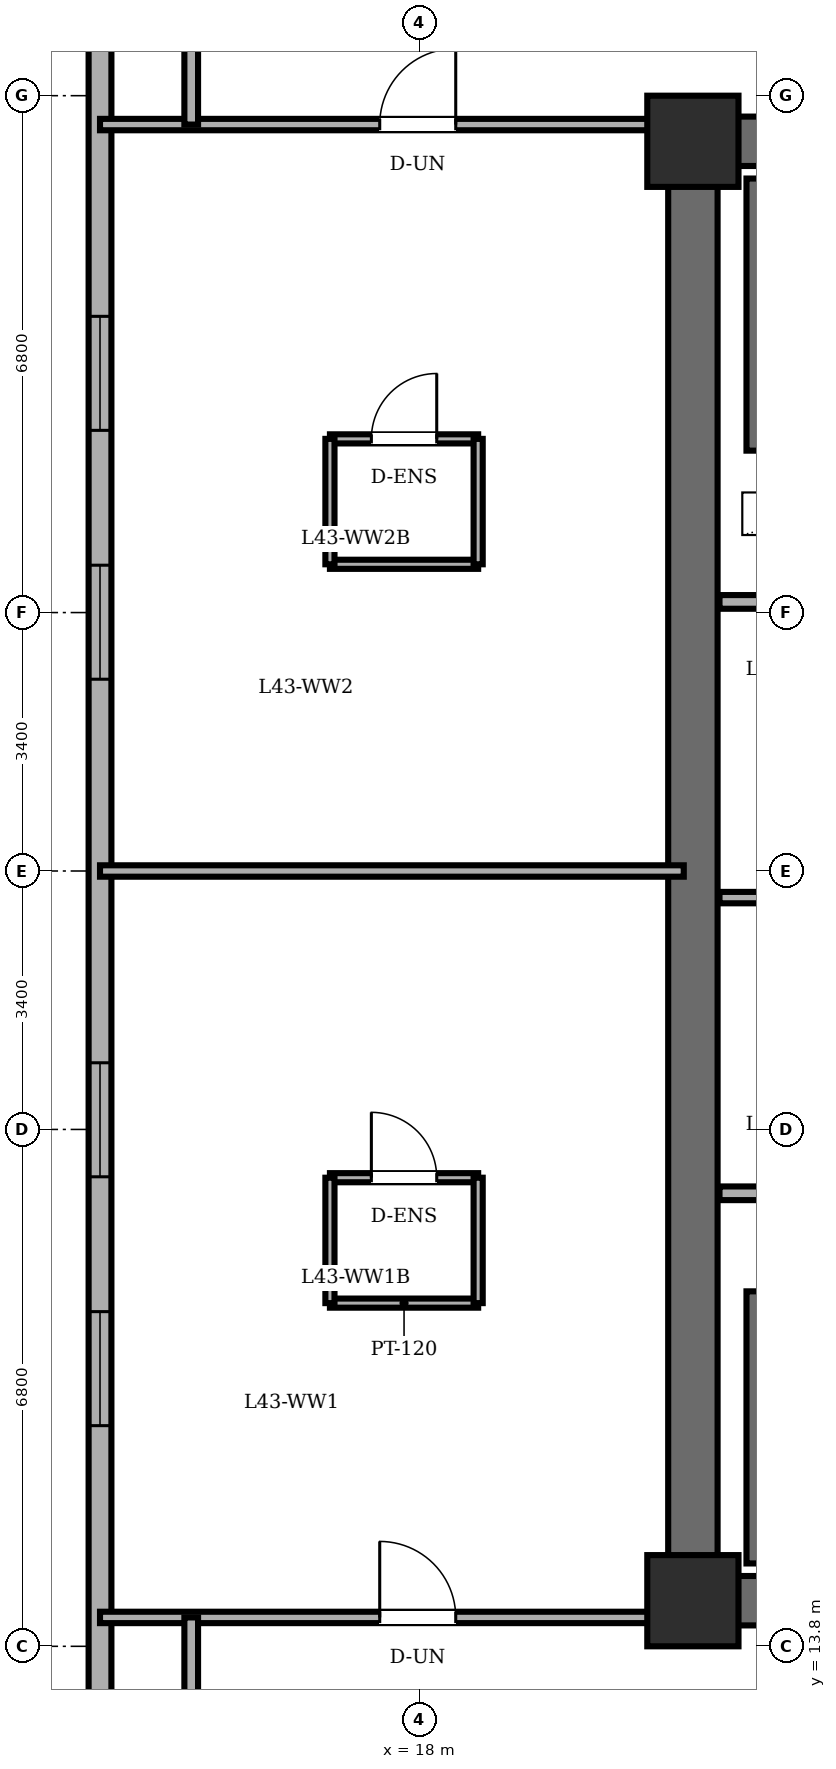
"""IFC4 building model, lengths in metres.
Left out: names, types, materials, properties, quantities, classifications, styles, units other than length and angle.
Written with IfcOpenShell. Run it as: python <this file> out.ifc"""

import sys

from ifc_helpers import new_model, si_unit, direction, frame, frame_2d, origin, origin_2d, place, context, subcontext, project, spatial, rectangle, extrude, element, fill, save


model = new_model("IFC4")
c1 = context("Model", 3, precision=1e-05, world=origin(), true_north=direction((0.0, 1.0)))
c2 = subcontext(c1, "Body", "Model", "MODEL_VIEW")
j1 = project(units=[si_unit("LENGTHUNIT", "METRE"), si_unit("PLANEANGLEUNIT", "RADIAN")], contexts=[c1])
p1 = place(None, origin())
s1 = spatial("IfcSite", under=j1, at=p1, CompositionType="ELEMENT")
p2 = place(p1, origin())
s2 = spatial("IfcBuilding", under=s1, at=p2, CompositionType="ELEMENT")
p3 = place(p2, frame((0.0, 0.0, 165.4)))
s3 = spatial("IfcBuildingStorey", under=s2, at=p3, CompositionType="ELEMENT", Elevation=165.4)
for number, where, z_axis, x_axis in (
    (1, (21.6, 14.4, 0.0), (0.0, 0.0, 1.0), (1.0, 0.0, 0.0)),
    (2, (21.6, 33.6, 0.0), (0.0, 0.0, 1.0), (1.0, 0.0, 0.0)),
):
    element("IfcColumn", number, at=place(p3, frame(where, z_axis=z_axis, x_axis=x_axis)), inside=s3, PredefinedType="COLUMN", context=c2, shape_type="SweptSolid", body=[
        extrude(rectangle(XDim=1.2, YDim=1.2, at=origin_2d()), origin(), (0.0, 0.0, 1.0), 3.6),
    ])
p4 = place(p3, frame((13.8, 36.3, 0.0), z_axis=(0.0, 0.0, 1.0), x_axis=(0.0, -1.0, 0.0)))
e3 = element("IfcWall", 3, at=p4, inside=s3, PredefinedType="SOLIDWALL", context=c2, shape_type="SweptSolid", body=[
    extrude(rectangle(XDim=24.6, YDim=0.3, at=frame_2d((12.3, 0.0))), origin(), (0.0, 0.0, 1.0), 3.4),
])
p5 = place(p4, frame((5.003, 0.0, 0.85)))
e4 = element("IfcOpeningElement", 4, at=p5, cuts=e3, PredefinedType="OPENING", context=c2, shape_type="SweptSolid", body=[
    extrude(rectangle(XDim=1.5, YDim=1.55, at=frame_2d((0.75, 0.775))), frame((0.0, 0.16, 0.0), z_axis=(0.0, -1.0, 0.0), x_axis=(1.0, 0.0, 0.0)), (0.0, 0.0, 1.0), 0.32),
])
p6 = place(p4, frame((8.277, 0.0, 0.85)))
e5 = element("IfcOpeningElement", 5, at=p6, cuts=e3, PredefinedType="OPENING", context=c2, shape_type="SweptSolid", body=[
    extrude(rectangle(XDim=1.5, YDim=1.55, at=frame_2d((0.75, 0.775))), frame((0.0, 0.16, 0.0), z_axis=(0.0, -1.0, 0.0), x_axis=(1.0, 0.0, 0.0)), (0.0, 0.0, 1.0), 0.32),
])
p7 = place(p4, frame((14.823, 0.0, 0.85)))
e6 = element("IfcOpeningElement", 6, at=p7, cuts=e3, PredefinedType="OPENING", context=c2, shape_type="SweptSolid", body=[
    extrude(rectangle(XDim=1.5, YDim=1.55, at=frame_2d((0.75, 0.775))), frame((0.0, 0.16, 0.0), z_axis=(0.0, -1.0, 0.0), x_axis=(1.0, 0.0, 0.0)), (0.0, 0.0, 1.0), 0.32),
])
p8 = place(p4, frame((18.097, 0.0, 0.85)))
e7 = element("IfcOpeningElement", 7, at=p8, cuts=e3, PredefinedType="OPENING", context=c2, shape_type="SweptSolid", body=[
    extrude(rectangle(XDim=1.5, YDim=1.55, at=frame_2d((0.75, 0.775))), frame((0.0, 0.16, 0.0), z_axis=(0.0, -1.0, 0.0), x_axis=(1.0, 0.0, 0.0)), (0.0, 0.0, 1.0), 0.32),
])
p9 = place(p3, frame((21.6, 14.4, 0.0), z_axis=(0.0, 0.0, 1.0), x_axis=(0.0, 1.0, 0.0)))
e8 = element("IfcWall", 8, at=p9, inside=s3, PredefinedType="SHEAR", context=c2, shape_type="SweptSolid", body=[
    extrude(rectangle(XDim=19.2, YDim=0.65, at=frame_2d((9.6, 0.0))), origin(), (0.0, 0.0, 1.0), 3.4),
])
for number, where, z_axis, x_axis in (
    (9, (21.6, 33.6, 0.0), (0.0, 0.0, 1.0), (1.0, 0.0, 0.0)),
    (10, (37.2, 14.4, 0.0), (0.0, 0.0, 1.0), (-1.0, 0.0, 0.0)),
):
    element("IfcWall", number, at=place(p3, frame(where, z_axis=z_axis, x_axis=x_axis)), inside=s3, PredefinedType="SHEAR", context=c2, shape_type="SweptSolid", body=[
        extrude(rectangle(XDim=15.6, YDim=0.65, at=frame_2d((7.8, 0.0))), origin(), (0.0, 0.0, 1.0), 3.4),
    ])
for number, where, z_axis, x_axis in (
    (11, (22.48, 29.53, 0.0), (0.0, 0.0, 1.0), (0.0, 1.0, 0.0)),
    (12, (22.48, 14.89, 0.0), (0.0, 0.0, 1.0), (0.0, 1.0, 0.0)),
):
    element("IfcWall", number, at=place(p3, frame(where, z_axis=z_axis, x_axis=x_axis)), inside=s3, PredefinedType="SOLIDWALL", context=c2, shape_type="SweptSolid", body=[
        extrude(rectangle(XDim=3.58, YDim=0.35, at=frame_2d((1.79, 0.0))), origin(), (0.0, 0.0, 1.0), 3.4),
    ])
p10 = place(p3, frame((21.95, 27.54, 0.0), z_axis=(0.0, 0.0, 1.0), x_axis=(1.0, 0.0, 0.0)))
e13 = element("IfcWall", 13, at=p10, inside=s3, PredefinedType="PARTITIONING", context=c2, shape_type="SweptSolid", body=[
    extrude(rectangle(XDim=10.56, YDim=0.18, at=frame_2d((5.28, 0.0))), origin(), (0.0, 0.0, 1.0), 3.4),
])
p11 = place(p3, frame((21.95, 19.76, 0.0), z_axis=(0.0, 0.0, 1.0), x_axis=(1.0, 0.0, 0.0)))
e14 = element("IfcWall", 14, at=p11, inside=s3, PredefinedType="PARTITIONING", context=c2, shape_type="SweptSolid", body=[
    extrude(rectangle(XDim=14.87, YDim=0.18, at=frame_2d((7.435, 0.0))), origin(), (0.0, 0.0, 1.0), 3.4),
])
p12 = place(p3, frame((21.95, 23.65, 0.0), z_axis=(0.0, 0.0, 1.0), x_axis=(1.0, 0.0, 0.0)))
e15 = element("IfcWall", 15, at=p12, inside=s3, PredefinedType="PARTITIONING", context=c2, shape_type="SweptSolid", body=[
    extrude(rectangle(XDim=2.51, YDim=0.15, at=frame_2d((1.255, 0.0))), origin(), (0.0, 0.0, 1.0), 3.4),
])
p13 = place(p3, frame((16.825, 19.965, 0.0), z_axis=(0.0, 0.0, 1.0), x_axis=(1.0, 0.0, 0.0)))
e16 = element("IfcWall", 16, at=p13, inside=s3, PredefinedType="PARTITIONING", context=c2, shape_type="SweptSolid", body=[
    extrude(rectangle(XDim=1.95, YDim=0.12, at=frame_2d((0.975, 0.0))), origin(), (0.0, 0.0, 1.0), 3.4),
])
p14 = place(p13, frame((0.545, 0.0, 0.0)))
e17 = element("IfcOpeningElement", 17, at=p14, cuts=e16, PredefinedType="OPENING", context=c2, shape_type="SweptSolid", body=[
    extrude(rectangle(XDim=0.86, YDim=2.1, at=frame_2d((0.43, 1.05))), frame((0.0, 0.07, 0.0), z_axis=(0.0, -1.0, 0.0), x_axis=(1.0, 0.0, 0.0)), (0.0, 0.0, 1.0), 0.14),
])
p15 = place(p3, frame((18.775, 18.315, 0.0), z_axis=(0.0, 0.0, 1.0), x_axis=(-1.0, 0.0, 0.0)))
e18 = element("IfcWall", 18, at=p15, inside=s3, PredefinedType="PARTITIONING", context=c2, shape_type="SweptSolid", body=[
    extrude(rectangle(XDim=1.95, YDim=0.12, at=frame_2d((0.975, 0.0))), origin(), (0.0, 0.0, 1.0), 3.4),
])
for number, where, z_axis, x_axis in (
    (19, (16.825, 19.965, 0.0), (0.0, 0.0, 1.0), (0.0, -1.0, 0.0)),
    (20, (18.775, 18.315, 0.0), (0.0, 0.0, 1.0), (0.0, 1.0, 0.0)),
):
    element("IfcWall", number, at=place(p3, frame(where, z_axis=z_axis, x_axis=x_axis)), inside=s3, PredefinedType="PARTITIONING", context=c2, shape_type="SweptSolid", body=[
        extrude(rectangle(XDim=1.65, YDim=0.12, at=frame_2d((0.825, 0.0))), origin(), (0.0, 0.0, 1.0), 3.4),
    ])
p16 = place(p3, frame((16.825, 29.685, 0.0), z_axis=(0.0, 0.0, 1.0), x_axis=(1.0, 0.0, 0.0)))
e21 = element("IfcWall", 21, at=p16, inside=s3, PredefinedType="PARTITIONING", context=c2, shape_type="SweptSolid", body=[
    extrude(rectangle(XDim=1.95, YDim=0.12, at=frame_2d((0.975, 0.0))), origin(), (0.0, 0.0, 1.0), 3.4),
])
p17 = place(p16, frame((0.545, 0.0, 0.0)))
e22 = element("IfcOpeningElement", 22, at=p17, cuts=e21, PredefinedType="OPENING", context=c2, shape_type="SweptSolid", body=[
    extrude(rectangle(XDim=0.86, YDim=2.1, at=frame_2d((0.43, 1.05))), frame((0.0, 0.07, 0.0), z_axis=(0.0, -1.0, 0.0), x_axis=(1.0, 0.0, 0.0)), (0.0, 0.0, 1.0), 0.14),
])
p18 = place(p3, frame((18.775, 28.035, 0.0), z_axis=(0.0, 0.0, 1.0), x_axis=(-1.0, 0.0, 0.0)))
e23 = element("IfcWall", 23, at=p18, inside=s3, PredefinedType="PARTITIONING", context=c2, shape_type="SweptSolid", body=[
    extrude(rectangle(XDim=1.95, YDim=0.12, at=frame_2d((0.975, 0.0))), origin(), (0.0, 0.0, 1.0), 3.4),
])
for number, where, z_axis, x_axis in (
    (24, (16.825, 29.685, 0.0), (0.0, 0.0, 1.0), (0.0, -1.0, 0.0)),
    (25, (18.775, 28.035, 0.0), (0.0, 0.0, 1.0), (0.0, 1.0, 0.0)),
):
    element("IfcWall", number, at=place(p3, frame(where, z_axis=z_axis, x_axis=x_axis)), inside=s3, PredefinedType="PARTITIONING", context=c2, shape_type="SweptSolid", body=[
        extrude(rectangle(XDim=1.65, YDim=0.12, at=frame_2d((0.825, 0.0))), origin(), (0.0, 0.0, 1.0), 3.4),
    ])
p19 = place(p3, frame((13.8, 14.18, 0.0), z_axis=(0.0, 0.0, 1.0), x_axis=(1.0, 0.0, 0.0)))
e26 = element("IfcWall", 26, at=p19, inside=s3, PredefinedType="PARTITIONING", context=c2, shape_type="SweptSolid", body=[
    extrude(rectangle(XDim=7.68, YDim=0.15, at=frame_2d((3.84, 0.0))), origin(), (0.0, 0.0, 1.0), 3.4),
])
p20 = place(p19, frame((3.68, 0.0, 0.0)))
e27 = element("IfcOpeningElement", 27, at=p20, cuts=e26, PredefinedType="OPENING", context=c2, shape_type="SweptSolid", body=[
    extrude(rectangle(XDim=1.0, YDim=2.15, at=frame_2d((0.5, 1.075))), frame((0.0, 0.085, 0.0), z_axis=(0.0, -1.0, 0.0), x_axis=(1.0, 0.0, 0.0)), (0.0, 0.0, 1.0), 0.17),
])
p21 = place(p3, frame((13.8, 24.0, 0.0), z_axis=(0.0, 0.0, 1.0), x_axis=(1.0, 0.0, 0.0)))
e28 = element("IfcWall", 28, at=p21, inside=s3, PredefinedType="PARTITIONING", context=c2, shape_type="SweptSolid", body=[
    extrude(rectangle(XDim=7.68, YDim=0.15, at=frame_2d((3.84, 0.0))), origin(), (0.0, 0.0, 1.0), 3.4),
])
p22 = place(p3, frame((13.8, 33.82, 0.0), z_axis=(0.0, 0.0, 1.0), x_axis=(1.0, 0.0, 0.0)))
e29 = element("IfcWall", 29, at=p22, inside=s3, PredefinedType="PARTITIONING", context=c2, shape_type="SweptSolid", body=[
    extrude(rectangle(XDim=7.68, YDim=0.15, at=frame_2d((3.84, 0.0))), origin(), (0.0, 0.0, 1.0), 3.4),
])
p23 = place(p22, frame((3.68, 0.0, 0.0)))
e30 = element("IfcOpeningElement", 30, at=p23, cuts=e29, PredefinedType="OPENING", context=c2, shape_type="SweptSolid", body=[
    extrude(rectangle(XDim=1.0, YDim=2.15, at=frame_2d((0.5, 1.075))), frame((0.0, 0.085, 0.0), z_axis=(0.0, -1.0, 0.0), x_axis=(1.0, 0.0, 0.0)), (0.0, 0.0, 1.0), 0.17),
])
for number, where, z_axis, x_axis in (
    (31, (15.0, 8.487, 0.0), (0.0, 0.0, 1.0), (0.0, 1.0, 0.0)),
    (32, (15.0, 33.82, 0.0), (0.0, 0.0, 1.0), (0.0, 1.0, 0.0)),
):
    element("IfcWall", number, at=place(p3, frame(where, z_axis=z_axis, x_axis=x_axis)), inside=s3, PredefinedType="PARTITIONING", context=c2, shape_type="SweptSolid", body=[
        extrude(rectangle(XDim=5.693, YDim=0.18, at=frame_2d((2.846, 0.0))), origin(), (0.0, 0.0, 1.0), 3.4),
    ])
p24 = place(p5, origin())
e33 = element("IfcWindow", 33, at=p24, inside=s3, PartitioningType="DOUBLE_PANEL_VERTICAL", PredefinedType="WINDOW", context=c2, shape_type="SweptSolid", body=[
    extrude(rectangle(XDim=1.5, YDim=1.55, at=frame_2d((0.75, 0.775))), frame((0.0, 0.03, 0.0), z_axis=(0.0, -1.0, 0.0), x_axis=(1.0, 0.0, 0.0)), (0.0, 0.0, 1.0), 0.06),
])
fill(e4, e33)
p25 = place(p6, origin())
e34 = element("IfcWindow", 34, at=p25, inside=s3, PartitioningType="DOUBLE_PANEL_VERTICAL", PredefinedType="WINDOW", context=c2, shape_type="SweptSolid", body=[
    extrude(rectangle(XDim=1.5, YDim=1.55, at=frame_2d((0.75, 0.775))), frame((0.0, 0.03, 0.0), z_axis=(0.0, -1.0, 0.0), x_axis=(1.0, 0.0, 0.0)), (0.0, 0.0, 1.0), 0.06),
])
fill(e5, e34)
p26 = place(p7, origin())
e35 = element("IfcWindow", 35, at=p26, inside=s3, PartitioningType="DOUBLE_PANEL_VERTICAL", PredefinedType="WINDOW", context=c2, shape_type="SweptSolid", body=[
    extrude(rectangle(XDim=1.5, YDim=1.55, at=frame_2d((0.75, 0.775))), frame((0.0, 0.03, 0.0), z_axis=(0.0, -1.0, 0.0), x_axis=(1.0, 0.0, 0.0)), (0.0, 0.0, 1.0), 0.06),
])
fill(e6, e35)
p27 = place(p8, origin())
e36 = element("IfcWindow", 36, at=p27, inside=s3, PartitioningType="DOUBLE_PANEL_VERTICAL", PredefinedType="WINDOW", context=c2, shape_type="SweptSolid", body=[
    extrude(rectangle(XDim=1.5, YDim=1.55, at=frame_2d((0.75, 0.775))), frame((0.0, 0.03, 0.0), z_axis=(0.0, -1.0, 0.0), x_axis=(1.0, 0.0, 0.0)), (0.0, 0.0, 1.0), 0.06),
])
fill(e7, e36)
p28 = place(p14, origin())
e37 = element("IfcDoor", 37, at=p28, inside=s3, OperationType="SINGLE_SWING_LEFT", PredefinedType="DOOR", context=c2, shape_type="SweptSolid", body=[
    extrude(rectangle(XDim=0.86, YDim=2.1, at=frame_2d((0.43, 1.05))), frame((0.0, 0.025, 0.0), z_axis=(0.0, -1.0, 0.0), x_axis=(1.0, 0.0, 0.0)), (0.0, 0.0, 1.0), 0.05),
])
fill(e17, e37)
p29 = place(p17, origin())
e38 = element("IfcDoor", 38, at=p29, inside=s3, OperationType="SINGLE_SWING_RIGHT", PredefinedType="DOOR", context=c2, shape_type="SweptSolid", body=[
    extrude(rectangle(XDim=0.86, YDim=2.1, at=frame_2d((0.43, 1.05))), frame((0.0, 0.025, 0.0), z_axis=(0.0, -1.0, 0.0), x_axis=(1.0, 0.0, 0.0)), (0.0, 0.0, 1.0), 0.05),
])
fill(e22, e38)
p30 = place(p20, origin())
e39 = element("IfcDoor", 39, at=p30, inside=s3, OperationType="SINGLE_SWING_LEFT", PredefinedType="DOOR", context=c2, shape_type="SweptSolid", body=[
    extrude(rectangle(XDim=1.0, YDim=2.15, at=frame_2d((0.5, 1.075))), frame((0.0, 0.025, 0.0), z_axis=(0.0, -1.0, 0.0), x_axis=(1.0, 0.0, 0.0)), (0.0, 0.0, 1.0), 0.05),
])
fill(e27, e39)
p31 = place(p23, origin())
e40 = element("IfcDoor", 40, at=p31, inside=s3, OperationType="SINGLE_SWING_RIGHT", PredefinedType="DOOR", context=c2, shape_type="SweptSolid", body=[
    extrude(rectangle(XDim=1.0, YDim=2.15, at=frame_2d((0.5, 1.075))), frame((0.0, 0.025, 0.0), z_axis=(0.0, -1.0, 0.0), x_axis=(1.0, 0.0, 0.0)), (0.0, 0.0, 1.0), 0.05),
])
fill(e30, e40)
save(model, sys.argv[1])
